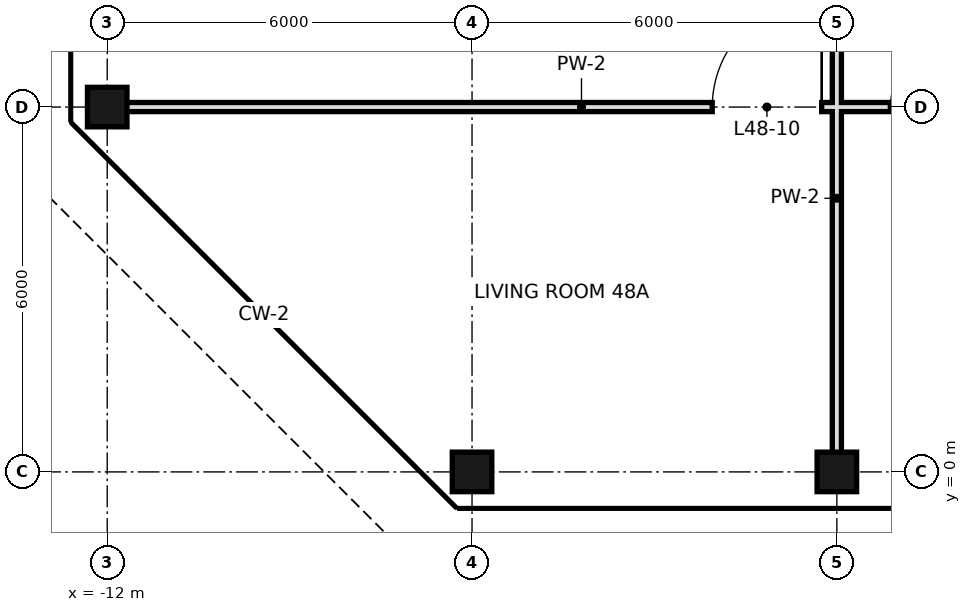
"""IFC4 building model, lengths in metres.
Left out: names, types, materials, properties, quantities, classifications, styles, units other than length and angle.
Written with IfcOpenShell. Run it as: python <this file> out.ifc"""

import sys

from ifc_helpers import new_model, si_unit, direction, frame, frame_2d, origin, origin_2d, place, context, subcontext, project, spatial, rectangle, hollow_rectangle, extrude, element, fill, save


model = new_model("IFC4")
c1 = context("Model", 3, precision=1e-05, world=origin(), true_north=direction((0.0, 1.0)))
c2 = subcontext(c1, "Body", "Model", "MODEL_VIEW")
j1 = project(units=[si_unit("LENGTHUNIT", "METRE"), si_unit("PLANEANGLEUNIT", "RADIAN")], contexts=[c1])
p1 = place(None, origin())
s1 = spatial("IfcSite", under=j1, at=p1, CompositionType="ELEMENT")
p2 = place(p1, origin())
s2 = spatial("IfcBuilding", under=s1, at=p2, CompositionType="ELEMENT")
p3 = place(p2, frame((0.0, 0.0, 206.4)))
s3 = spatial("IfcBuildingStorey", under=s2, at=p3, CompositionType="ELEMENT", Elevation=206.4)
for number, where, z_axis, x_axis in (
    (1, (-12.0, 6.0, 0.0), (0.0, 0.0, 1.0), (1.0, 0.0, 0.0)),
    (2, (-6.0, 0.0, 0.0), (0.0, 0.0, 1.0), (1.0, 0.0, 0.0)),
    (3, (0.0, 0.0, 0.0), (0.0, 0.0, 1.0), (1.0, 0.0, 0.0)),
):
    element("IfcColumn", number, at=place(p3, frame(where, z_axis=z_axis, x_axis=x_axis)), inside=s3, PredefinedType="COLUMN", context=c2, shape_type="SweptSolid", body=[
        extrude(hollow_rectangle(XDim=0.65, YDim=0.65, WallThickness=0.032, at=origin_2d()), origin(), (0.0, 0.0, 1.0), 3.6),
    ])
p4 = place(p3, frame((0.0, 0.0, 0.0), z_axis=(0.0, 0.0, 1.0), x_axis=(0.0, 1.0, 0.0)))
e4 = element("IfcWall", 4, at=p4, inside=s3, PredefinedType="PARTITIONING", context=c2, shape_type="SweptSolid", body=[
    extrude(rectangle(XDim=9.0, YDim=0.15, at=frame_2d((4.5, 0.0))), origin(), (0.0, 0.0, 1.0), 2.68),
])
p5 = place(p3, frame((-12.0, 6.0, 0.0), z_axis=(0.0, 0.0, 1.0), x_axis=(1.0, 0.0, 0.0)))
e5 = element("IfcWall", 5, at=p5, inside=s3, PredefinedType="PARTITIONING", context=c2, shape_type="SweptSolid", body=[
    extrude(rectangle(XDim=15.6, YDim=0.15, at=frame_2d((7.8, 0.0))), origin(), (0.0, 0.0, 1.0), 2.68),
])
p6 = place(p5, frame((9.95, 0.0, 0.0)))
e6 = element("IfcOpeningElement", 6, at=p6, cuts=e5, PredefinedType="OPENING", context=c2, shape_type="SweptSolid", body=[
    extrude(rectangle(XDim=1.8, YDim=2.4, at=frame_2d((0.9, 1.2))), frame((0.0, 0.085, 0.0), z_axis=(0.0, -1.0, 0.0), x_axis=(1.0, 0.0, 0.0)), (0.0, 0.0, 1.0), 0.17),
])
p7 = place(p5, frame((12.88, 0.0, 0.0)))
e7 = element("IfcOpeningElement", 7, at=p7, cuts=e5, PredefinedType="OPENING", context=c2, shape_type="SweptSolid", body=[
    extrude(rectangle(XDim=1.0, YDim=2.4, at=frame_2d((0.5, 1.2))), frame((0.0, 0.085, 0.0), z_axis=(0.0, -1.0, 0.0), x_axis=(1.0, 0.0, 0.0)), (0.0, 0.0, 1.0), 0.17),
])
p8 = place(p6, frame((1.8, 0.0, 0.0), z_axis=(0.0, 0.0, 1.0), x_axis=(-1.0, 0.0, 0.0)))
e8 = element("IfcDoor", 8, at=p8, inside=s3, OperationType="SINGLE_SWING_LEFT", PredefinedType="DOOR", context=c2, shape_type="SweptSolid", body=[
    extrude(rectangle(XDim=1.8, YDim=2.4, at=frame_2d((0.9, 1.2))), frame((0.0, 0.025, 0.0), z_axis=(0.0, -1.0, 0.0), x_axis=(1.0, 0.0, 0.0)), (0.0, 0.0, 1.0), 0.05),
])
fill(e6, e8)
p9 = place(p7, frame((1.0, 0.0, 0.0), z_axis=(0.0, 0.0, 1.0), x_axis=(-1.0, 0.0, 0.0)))
e9 = element("IfcDoor", 9, at=p9, inside=s3, OperationType="SINGLE_SWING_LEFT", PredefinedType="DOOR", context=c2, shape_type="SweptSolid", body=[
    extrude(rectangle(XDim=1.0, YDim=2.4, at=frame_2d((0.5, 1.2))), frame((0.0, 0.025, 0.0), z_axis=(0.0, -1.0, 0.0), x_axis=(1.0, 0.0, 0.0)), (0.0, 0.0, 1.0), 0.05),
])
fill(e7, e9)
save(model, sys.argv[1])
